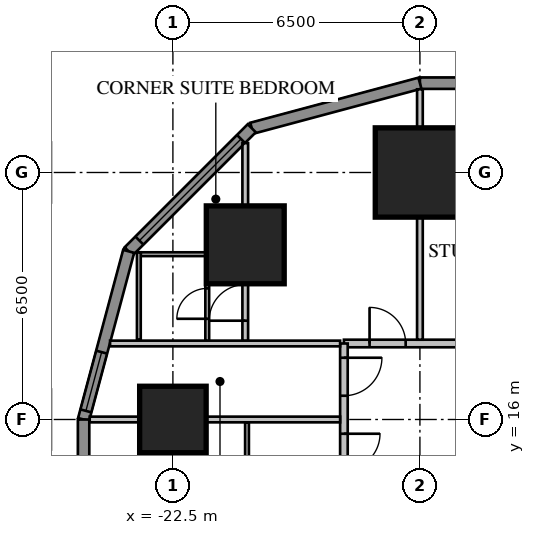
"""IFC4 building model, lengths in metres.
Left out: names, types, materials, properties, quantities, classifications, styles, units other than length and angle.
Written with IfcOpenShell. Run it as: python <this file> out.ifc"""

import sys

from ifc_helpers import new_model, si_unit, direction, frame, frame_2d, origin, origin_2d, place, context, subcontext, project, spatial, rectangle, extrude, element, fill, save


model = new_model("IFC4")
c1 = context("Model", 3, precision=1e-05, world=origin(), true_north=direction((0.0, 1.0)))
c2 = subcontext(c1, "Body", "Model", "MODEL_VIEW")
j1 = project(units=[si_unit("LENGTHUNIT", "METRE"), si_unit("PLANEANGLEUNIT", "RADIAN")], contexts=[c1])
p1 = place(None, origin())
s1 = spatial("IfcSite", under=j1, at=p1, CompositionType="ELEMENT")
p2 = place(p1, origin())
s2 = spatial("IfcBuilding", under=s1, at=p2, CompositionType="ELEMENT")
p3 = place(p2, frame((0.0, 0.0, 50.65)))
s3 = spatial("IfcBuildingStorey", under=s2, at=p3, CompositionType="ELEMENT", Elevation=50.65)
p4 = place(p3, frame((-16.0, 22.5, 0.0), z_axis=(0.0, 0.0, 1.0), x_axis=(1.0, 0.0, 0.0)))
e1 = element("IfcColumn", 1, at=p4, inside=s3, PredefinedType="COLUMN", context=c2, shape_type="SweptSolid", body=[
    extrude(rectangle(XDim=2.35, YDim=2.35, at=origin_2d()), origin(), (0.0, 0.0, 1.0), 3.413),
])
p5 = place(p3, frame((-20.596, 20.596, 0.0), z_axis=(0.0, 0.0, 1.0), x_axis=(1.0, 0.0, 0.0)))
e2 = element("IfcColumn", 2, at=p5, inside=s3, PredefinedType="COLUMN", context=c2, shape_type="SweptSolid", body=[
    extrude(rectangle(XDim=2.05, YDim=2.05, at=origin_2d()), origin(), (0.0, 0.0, 1.0), 3.413),
])
p6 = place(p3, frame((-22.5, 16.0, 0.0), z_axis=(0.0, 0.0, 1.0), x_axis=(1.0, 0.0, 0.0)))
e3 = element("IfcColumn", 3, at=p6, inside=s3, PredefinedType="COLUMN", context=c2, shape_type="SweptSolid", body=[
    extrude(rectangle(XDim=1.75, YDim=1.75, at=origin_2d()), origin(), (0.0, 0.0, 1.0), 3.413),
])
p7 = place(p3, frame((16.0, 24.85, 0.0), z_axis=(0.0, 0.0, 1.0), x_axis=(-1.0, 0.0, 0.0)))
e4 = element("IfcWall", 4, at=p7, inside=s3, PredefinedType="SOLIDWALL", context=c2, shape_type="SweptSolid", body=[
    extrude(rectangle(XDim=32.0, YDim=0.3, at=frame_2d((16.0, 0.0))), origin(), (0.0, 0.0, 1.0), 3.65),
])
p8 = place(p7, frame((1.2, 0.0, 0.75)))
e5 = element("IfcOpeningElement", 5, at=p8, cuts=e4, PredefinedType="OPENING", context=c2, shape_type="SweptSolid", body=[
    extrude(rectangle(XDim=1.6, YDim=1.8, at=frame_2d((0.8, 0.9))), frame((0.0, 0.17, 0.0), z_axis=(0.0, -1.0, 0.0), x_axis=(1.0, 0.0, 0.0)), (0.0, 0.0, 1.0), 0.34),
])
p9 = place(p7, frame((5.2, 0.0, 0.75)))
e6 = element("IfcOpeningElement", 6, at=p9, cuts=e4, PredefinedType="OPENING", context=c2, shape_type="SweptSolid", body=[
    extrude(rectangle(XDim=1.6, YDim=1.8, at=frame_2d((0.8, 0.9))), frame((0.0, 0.17, 0.0), z_axis=(0.0, -1.0, 0.0), x_axis=(1.0, 0.0, 0.0)), (0.0, 0.0, 1.0), 0.34),
])
p10 = place(p7, frame((17.2, 0.0, 0.75)))
e7 = element("IfcOpeningElement", 7, at=p10, cuts=e4, PredefinedType="OPENING", context=c2, shape_type="SweptSolid", body=[
    extrude(rectangle(XDim=1.6, YDim=1.8, at=frame_2d((0.8, 0.9))), frame((0.0, 0.17, 0.0), z_axis=(0.0, -1.0, 0.0), x_axis=(1.0, 0.0, 0.0)), (0.0, 0.0, 1.0), 0.34),
])
p11 = place(p7, frame((21.2, 0.0, 0.75)))
e8 = element("IfcOpeningElement", 8, at=p11, cuts=e4, PredefinedType="OPENING", context=c2, shape_type="SweptSolid", body=[
    extrude(rectangle(XDim=1.6, YDim=1.8, at=frame_2d((0.8, 0.9))), frame((0.0, 0.17, 0.0), z_axis=(0.0, -1.0, 0.0), x_axis=(1.0, 0.0, 0.0)), (0.0, 0.0, 1.0), 0.34),
])
p12 = place(p7, frame((25.2, 0.0, 0.75)))
e9 = element("IfcOpeningElement", 9, at=p12, cuts=e4, PredefinedType="OPENING", context=c2, shape_type="SweptSolid", body=[
    extrude(rectangle(XDim=1.6, YDim=1.8, at=frame_2d((0.8, 0.9))), frame((0.0, 0.17, 0.0), z_axis=(0.0, -1.0, 0.0), x_axis=(1.0, 0.0, 0.0)), (0.0, 0.0, 1.0), 0.34),
])
p13 = place(p7, frame((29.2, 0.0, 0.75)))
e10 = element("IfcOpeningElement", 10, at=p13, cuts=e4, PredefinedType="OPENING", context=c2, shape_type="SweptSolid", body=[
    extrude(rectangle(XDim=1.6, YDim=1.8, at=frame_2d((0.8, 0.9))), frame((0.0, 0.17, 0.0), z_axis=(0.0, -1.0, 0.0), x_axis=(1.0, 0.0, 0.0)), (0.0, 0.0, 1.0), 0.34),
])
p14 = place(p7, frame((8.8, 0.0, 0.75)))
e11 = element("IfcOpeningElement", 11, at=p14, cuts=e4, PredefinedType="OPENING", context=c2, shape_type="SweptSolid", body=[
    extrude(rectangle(XDim=2.4, YDim=1.8, at=frame_2d((1.2, 0.9))), frame((0.0, 0.17, 0.0), z_axis=(0.0, -1.0, 0.0), x_axis=(1.0, 0.0, 0.0)), (0.0, 0.0, 1.0), 0.34),
])
p15 = place(p7, frame((13.812, 0.0, 0.0)))
e12 = element("IfcOpeningElement", 12, at=p15, cuts=e4, PredefinedType="OPENING", context=c2, shape_type="SweptSolid", body=[
    extrude(rectangle(XDim=1.0, YDim=2.4, at=frame_2d((0.5, 1.2))), frame((0.0, 0.17, 0.0), z_axis=(0.0, -1.0, 0.0), x_axis=(1.0, 0.0, 0.0)), (0.0, 0.0, 1.0), 0.34),
])
p16 = place(p3, frame((-16.0, 24.85, 0.0), z_axis=(0.0, 0.0, 1.0), x_axis=(-0.965920218567, -0.258839972501, 0.0)))
e13 = element("IfcWall", 13, at=p16, inside=s3, PredefinedType="SOLIDWALL", context=c2, shape_type="SweptSolid", body=[
    extrude(rectangle(XDim=4.581, YDim=0.3, at=frame_2d((2.291, 0.0))), origin(), (0.0, 0.0, 1.0), 3.65),
])
p17 = place(p3, frame((-20.425, 23.664, 0.0), z_axis=(0.0, 0.0, 1.0), x_axis=(-0.707106781187, -0.707106781187, 0.0)))
e14 = element("IfcWall", 14, at=p17, inside=s3, PredefinedType="SOLIDWALL", context=c2, shape_type="SweptSolid", body=[
    extrude(rectangle(XDim=4.581, YDim=0.3, at=frame_2d((2.291, 0.0))), origin(), (0.0, 0.0, 1.0), 3.65),
])
p18 = place(p17, frame((0.4, 0.0, 0.75)))
e15 = element("IfcOpeningElement", 15, at=p18, cuts=e14, PredefinedType="OPENING", context=c2, shape_type="SweptSolid", body=[
    extrude(rectangle(XDim=3.781, YDim=1.8, at=frame_2d((1.891, 0.9))), frame((0.0, 0.17, 0.0), z_axis=(0.0, -1.0, 0.0), x_axis=(1.0, 0.0, 0.0)), (0.0, 0.0, 1.0), 0.34),
])
p19 = place(p3, frame((-23.664, 20.425, 0.0), z_axis=(0.0, 0.0, 1.0), x_axis=(-0.258839972501, -0.965920218567, 0.0)))
e16 = element("IfcWall", 16, at=p19, inside=s3, PredefinedType="SOLIDWALL", context=c2, shape_type="SweptSolid", body=[
    extrude(rectangle(XDim=4.581, YDim=0.3, at=frame_2d((2.291, 0.0))), origin(), (0.0, 0.0, 1.0), 3.65),
])
p20 = place(p19, frame((2.746, 0.0, 0.75)))
e17 = element("IfcOpeningElement", 17, at=p20, cuts=e16, PredefinedType="OPENING", context=c2, shape_type="SweptSolid", body=[
    extrude(rectangle(XDim=1.6, YDim=1.8, at=frame_2d((0.8, 0.9))), frame((0.0, 0.17, 0.0), z_axis=(0.0, -1.0, 0.0), x_axis=(1.0, 0.0, 0.0)), (0.0, 0.0, 1.0), 0.34),
])
p21 = place(p3, frame((-24.85, 16.0, 0.0), z_axis=(0.0, 0.0, 1.0), x_axis=(0.0, -1.0, 0.0)))
e18 = element("IfcWall", 18, at=p21, inside=s3, PredefinedType="SOLIDWALL", context=c2, shape_type="SweptSolid", body=[
    extrude(rectangle(XDim=32.0, YDim=0.3, at=frame_2d((16.0, 0.0))), origin(), (0.0, 0.0, 1.0), 3.65),
])
p22 = place(p21, frame((1.2, 0.0, 0.75)))
e19 = element("IfcOpeningElement", 19, at=p22, cuts=e18, PredefinedType="OPENING", context=c2, shape_type="SweptSolid", body=[
    extrude(rectangle(XDim=1.6, YDim=1.8, at=frame_2d((0.8, 0.9))), frame((0.0, 0.17, 0.0), z_axis=(0.0, -1.0, 0.0), x_axis=(1.0, 0.0, 0.0)), (0.0, 0.0, 1.0), 0.34),
])
p23 = place(p21, frame((5.2, 0.0, 0.75)))
e20 = element("IfcOpeningElement", 20, at=p23, cuts=e18, PredefinedType="OPENING", context=c2, shape_type="SweptSolid", body=[
    extrude(rectangle(XDim=1.6, YDim=1.8, at=frame_2d((0.8, 0.9))), frame((0.0, 0.17, 0.0), z_axis=(0.0, -1.0, 0.0), x_axis=(1.0, 0.0, 0.0)), (0.0, 0.0, 1.0), 0.34),
])
p24 = place(p21, frame((17.2, 0.0, 0.75)))
e21 = element("IfcOpeningElement", 21, at=p24, cuts=e18, PredefinedType="OPENING", context=c2, shape_type="SweptSolid", body=[
    extrude(rectangle(XDim=1.6, YDim=1.8, at=frame_2d((0.8, 0.9))), frame((0.0, 0.17, 0.0), z_axis=(0.0, -1.0, 0.0), x_axis=(1.0, 0.0, 0.0)), (0.0, 0.0, 1.0), 0.34),
])
p25 = place(p21, frame((21.2, 0.0, 0.75)))
e22 = element("IfcOpeningElement", 22, at=p25, cuts=e18, PredefinedType="OPENING", context=c2, shape_type="SweptSolid", body=[
    extrude(rectangle(XDim=1.6, YDim=1.8, at=frame_2d((0.8, 0.9))), frame((0.0, 0.17, 0.0), z_axis=(0.0, -1.0, 0.0), x_axis=(1.0, 0.0, 0.0)), (0.0, 0.0, 1.0), 0.34),
])
p26 = place(p21, frame((25.2, 0.0, 0.75)))
e23 = element("IfcOpeningElement", 23, at=p26, cuts=e18, PredefinedType="OPENING", context=c2, shape_type="SweptSolid", body=[
    extrude(rectangle(XDim=1.6, YDim=1.8, at=frame_2d((0.8, 0.9))), frame((0.0, 0.17, 0.0), z_axis=(0.0, -1.0, 0.0), x_axis=(1.0, 0.0, 0.0)), (0.0, 0.0, 1.0), 0.34),
])
p27 = place(p21, frame((29.2, 0.0, 0.75)))
e24 = element("IfcOpeningElement", 24, at=p27, cuts=e18, PredefinedType="OPENING", context=c2, shape_type="SweptSolid", body=[
    extrude(rectangle(XDim=1.6, YDim=1.8, at=frame_2d((0.8, 0.9))), frame((0.0, 0.17, 0.0), z_axis=(0.0, -1.0, 0.0), x_axis=(1.0, 0.0, 0.0)), (0.0, 0.0, 1.0), 0.34),
])
p28 = place(p21, frame((8.8, 0.0, 0.75)))
e25 = element("IfcOpeningElement", 25, at=p28, cuts=e18, PredefinedType="OPENING", context=c2, shape_type="SweptSolid", body=[
    extrude(rectangle(XDim=2.4, YDim=1.8, at=frame_2d((1.2, 0.9))), frame((0.0, 0.17, 0.0), z_axis=(0.0, -1.0, 0.0), x_axis=(1.0, 0.0, 0.0)), (0.0, 0.0, 1.0), 0.34),
])
p29 = place(p21, frame((13.812, 0.0, 0.0)))
e26 = element("IfcOpeningElement", 26, at=p29, cuts=e18, PredefinedType="OPENING", context=c2, shape_type="SweptSolid", body=[
    extrude(rectangle(XDim=1.0, YDim=2.4, at=frame_2d((0.5, 1.2))), frame((0.0, 0.17, 0.0), z_axis=(0.0, -1.0, 0.0), x_axis=(1.0, 0.0, 0.0)), (0.0, 0.0, 1.0), 0.34),
])
p30 = place(p3, frame((18.0, 18.0, 0.0), z_axis=(0.0, 0.0, 1.0), x_axis=(-1.0, 0.0, 0.0)))
e27 = element("IfcWall", 27, at=p30, inside=s3, PredefinedType="PARTITIONING", context=c2, shape_type="SweptSolid", body=[
    extrude(rectangle(XDim=36.0, YDim=0.2, at=frame_2d((18.0, 0.0))), origin(), (0.0, 0.0, 1.0), 3.65),
])
p31 = place(p30, frame((0.375, 0.0, 0.0)))
e28 = element("IfcOpeningElement", 28, at=p31, cuts=e27, PredefinedType="OPENING", context=c2, shape_type="SweptSolid", body=[
    extrude(rectangle(XDim=1.0, YDim=2.1, at=frame_2d((0.5, 1.05))), frame((0.0, 0.12, 0.0), z_axis=(0.0, -1.0, 0.0), x_axis=(1.0, 0.0, 0.0)), (0.0, 0.0, 1.0), 0.24),
])
p32 = place(p30, frame((3.95, 0.0, 0.0)))
e29 = element("IfcOpeningElement", 29, at=p32, cuts=e27, PredefinedType="OPENING", context=c2, shape_type="SweptSolid", body=[
    extrude(rectangle(XDim=0.95, YDim=2.1, at=frame_2d((0.475, 1.05))), frame((0.0, 0.12, 0.0), z_axis=(0.0, -1.0, 0.0), x_axis=(1.0, 0.0, 0.0)), (0.0, 0.0, 1.0), 0.24),
])
p33 = place(p30, frame((7.95, 0.0, 0.0)))
e30 = element("IfcOpeningElement", 30, at=p33, cuts=e27, PredefinedType="OPENING", context=c2, shape_type="SweptSolid", body=[
    extrude(rectangle(XDim=0.95, YDim=2.1, at=frame_2d((0.475, 1.05))), frame((0.0, 0.12, 0.0), z_axis=(0.0, -1.0, 0.0), x_axis=(1.0, 0.0, 0.0)), (0.0, 0.0, 1.0), 0.24),
])
p34 = place(p30, frame((19.95, 0.0, 0.0)))
e31 = element("IfcOpeningElement", 31, at=p34, cuts=e27, PredefinedType="OPENING", context=c2, shape_type="SweptSolid", body=[
    extrude(rectangle(XDim=0.95, YDim=2.1, at=frame_2d((0.475, 1.05))), frame((0.0, 0.12, 0.0), z_axis=(0.0, -1.0, 0.0), x_axis=(1.0, 0.0, 0.0)), (0.0, 0.0, 1.0), 0.24),
])
p35 = place(p30, frame((23.95, 0.0, 0.0)))
e32 = element("IfcOpeningElement", 32, at=p35, cuts=e27, PredefinedType="OPENING", context=c2, shape_type="SweptSolid", body=[
    extrude(rectangle(XDim=0.95, YDim=2.1, at=frame_2d((0.475, 1.05))), frame((0.0, 0.12, 0.0), z_axis=(0.0, -1.0, 0.0), x_axis=(1.0, 0.0, 0.0)), (0.0, 0.0, 1.0), 0.24),
])
p36 = place(p30, frame((27.95, 0.0, 0.0)))
e33 = element("IfcOpeningElement", 33, at=p36, cuts=e27, PredefinedType="OPENING", context=c2, shape_type="SweptSolid", body=[
    extrude(rectangle(XDim=0.95, YDim=2.1, at=frame_2d((0.475, 1.05))), frame((0.0, 0.12, 0.0), z_axis=(0.0, -1.0, 0.0), x_axis=(1.0, 0.0, 0.0)), (0.0, 0.0, 1.0), 0.24),
])
p37 = place(p30, frame((31.95, 0.0, 0.0)))
e34 = element("IfcOpeningElement", 34, at=p37, cuts=e27, PredefinedType="OPENING", context=c2, shape_type="SweptSolid", body=[
    extrude(rectangle(XDim=0.95, YDim=2.1, at=frame_2d((0.475, 1.05))), frame((0.0, 0.12, 0.0), z_axis=(0.0, -1.0, 0.0), x_axis=(1.0, 0.0, 0.0)), (0.0, 0.0, 1.0), 0.24),
])
p38 = place(p30, frame((34.375, 0.0, 0.0)))
e35 = element("IfcOpeningElement", 35, at=p38, cuts=e27, PredefinedType="OPENING", context=c2, shape_type="SweptSolid", body=[
    extrude(rectangle(XDim=0.95, YDim=2.1, at=frame_2d((0.475, 1.05))), frame((0.0, 0.12, 0.0), z_axis=(0.0, -1.0, 0.0), x_axis=(1.0, 0.0, 0.0)), (0.0, 0.0, 1.0), 0.24),
])
p39 = place(p30, frame((11.2, 0.0, 0.0)))
e36 = element("IfcOpeningElement", 36, at=p39, cuts=e27, PredefinedType="OPENING", context=c2, shape_type="SweptSolid", body=[
    extrude(rectangle(XDim=1.0, YDim=2.1, at=frame_2d((0.5, 1.05))), frame((0.0, 0.12, 0.0), z_axis=(0.0, -1.0, 0.0), x_axis=(1.0, 0.0, 0.0)), (0.0, 0.0, 1.0), 0.24),
])
p40 = place(p30, frame((15.2, 0.0, 0.0)))
e37 = element("IfcOpeningElement", 37, at=p40, cuts=e27, PredefinedType="OPENING", context=c2, shape_type="SweptSolid", body=[
    extrude(rectangle(XDim=1.0, YDim=2.1, at=frame_2d((0.5, 1.05))), frame((0.0, 0.12, 0.0), z_axis=(0.0, -1.0, 0.0), x_axis=(1.0, 0.0, 0.0)), (0.0, 0.0, 1.0), 0.24),
])
p41 = place(p3, frame((-16.0, 18.1, 0.0), z_axis=(0.0, 0.0, 1.0), x_axis=(0.0, 1.0, 0.0)))
e38 = element("IfcWall", 38, at=p41, inside=s3, PredefinedType="PARTITIONING", context=c2, shape_type="SweptSolid", body=[
    extrude(rectangle(XDim=6.589, YDim=0.15, at=frame_2d((3.295, 0.0))), origin(), (0.0, 0.0, 1.0), 3.65),
])
p42 = place(p3, frame((-21.596, 18.065, 0.0), z_axis=(0.0, 0.0, 1.0), x_axis=(0.0, 1.0, 0.0)))
e39 = element("IfcWall", 39, at=p42, inside=s3, PredefinedType="PARTITIONING", context=c2, shape_type="SweptSolid", body=[
    extrude(rectangle(XDim=2.335, YDim=0.1, at=frame_2d((1.167, 0.0))), origin(), (0.0, 0.0, 1.0), 3.65),
])
p43 = place(p42, frame((0.585, 0.0, 0.0)))
e40 = element("IfcOpeningElement", 40, at=p43, cuts=e39, PredefinedType="OPENING", context=c2, shape_type="SweptSolid", body=[
    extrude(rectangle(XDim=0.8, YDim=2.1, at=frame_2d((0.4, 1.05))), frame((0.0, 0.07, 0.0), z_axis=(0.0, -1.0, 0.0), x_axis=(1.0, 0.0, 0.0)), (0.0, 0.0, 1.0), 0.14),
])
p44 = place(p3, frame((-21.646, 20.35, 0.0), z_axis=(0.0, 0.0, 1.0), x_axis=(-1.0, 0.0, 0.0)))
e41 = element("IfcWall", 41, at=p44, inside=s3, PredefinedType="PARTITIONING", context=c2, shape_type="SweptSolid", body=[
    extrude(rectangle(XDim=1.7, YDim=0.1, at=frame_2d((0.85, 0.0))), origin(), (0.0, 0.0, 1.0), 3.65),
])
p45 = place(p3, frame((-23.396, 18.1, 0.0), z_axis=(0.0, 0.0, 1.0), x_axis=(0.0, 1.0, 0.0)))
e42 = element("IfcWall", 42, at=p45, inside=s3, PredefinedType="PARTITIONING", context=c2, shape_type="SweptSolid", body=[
    extrude(rectangle(XDim=2.3, YDim=0.1, at=frame_2d((1.15, 0.0))), origin(), (0.0, 0.0, 1.0), 3.65),
])
p46 = place(p3, frame((-20.596, 18.065, 0.0), z_axis=(0.0, 0.0, 1.0), x_axis=(0.0, 1.0, 0.0)))
e43 = element("IfcWall", 43, at=p46, inside=s3, PredefinedType="PARTITIONING", context=c2, shape_type="SweptSolid", body=[
    extrude(rectangle(XDim=5.209, YDim=0.15, at=frame_2d((2.604, 0.0))), origin(), (0.0, 0.0, 1.0), 3.65),
])
p47 = place(p46, frame((0.535, 0.0, 0.0)))
e44 = element("IfcOpeningElement", 44, at=p47, cuts=e43, PredefinedType="OPENING", context=c2, shape_type="SweptSolid", body=[
    extrude(rectangle(XDim=0.95, YDim=2.1, at=frame_2d((0.475, 1.05))), frame((0.0, 0.095, 0.0), z_axis=(0.0, -1.0, 0.0), x_axis=(1.0, 0.0, 0.0)), (0.0, 0.0, 1.0), 0.19),
])
p48 = place(p3, frame((-18.0, 18.0, 0.0), z_axis=(0.0, 0.0, 1.0), x_axis=(0.0, -1.0, 0.0)))
e45 = element("IfcWall", 45, at=p48, inside=s3, PredefinedType="PARTITIONING", context=c2, shape_type="SweptSolid", body=[
    extrude(rectangle(XDim=36.0, YDim=0.2, at=frame_2d((18.0, 0.0))), origin(), (0.0, 0.0, 1.0), 3.65),
])
p49 = place(p48, frame((0.375, 0.0, 0.0)))
e46 = element("IfcOpeningElement", 46, at=p49, cuts=e45, PredefinedType="OPENING", context=c2, shape_type="SweptSolid", body=[
    extrude(rectangle(XDim=1.0, YDim=2.1, at=frame_2d((0.5, 1.05))), frame((0.0, 0.12, 0.0), z_axis=(0.0, -1.0, 0.0), x_axis=(1.0, 0.0, 0.0)), (0.0, 0.0, 1.0), 0.24),
])
p50 = place(p48, frame((2.375, 0.0, 0.0)))
e47 = element("IfcOpeningElement", 47, at=p50, cuts=e45, PredefinedType="OPENING", context=c2, shape_type="SweptSolid", body=[
    extrude(rectangle(XDim=0.95, YDim=2.1, at=frame_2d((0.475, 1.05))), frame((0.0, 0.12, 0.0), z_axis=(0.0, -1.0, 0.0), x_axis=(1.0, 0.0, 0.0)), (0.0, 0.0, 1.0), 0.24),
])
p51 = place(p48, frame((7.95, 0.0, 0.0)))
e48 = element("IfcOpeningElement", 48, at=p51, cuts=e45, PredefinedType="OPENING", context=c2, shape_type="SweptSolid", body=[
    extrude(rectangle(XDim=0.95, YDim=2.1, at=frame_2d((0.475, 1.05))), frame((0.0, 0.12, 0.0), z_axis=(0.0, -1.0, 0.0), x_axis=(1.0, 0.0, 0.0)), (0.0, 0.0, 1.0), 0.24),
])
p52 = place(p48, frame((18.375, 0.0, 0.0)))
e49 = element("IfcOpeningElement", 49, at=p52, cuts=e45, PredefinedType="OPENING", context=c2, shape_type="SweptSolid", body=[
    extrude(rectangle(XDim=0.95, YDim=2.1, at=frame_2d((0.475, 1.05))), frame((0.0, 0.12, 0.0), z_axis=(0.0, -1.0, 0.0), x_axis=(1.0, 0.0, 0.0)), (0.0, 0.0, 1.0), 0.24),
])
p53 = place(p48, frame((23.95, 0.0, 0.0)))
e50 = element("IfcOpeningElement", 50, at=p53, cuts=e45, PredefinedType="OPENING", context=c2, shape_type="SweptSolid", body=[
    extrude(rectangle(XDim=0.95, YDim=2.1, at=frame_2d((0.475, 1.05))), frame((0.0, 0.12, 0.0), z_axis=(0.0, -1.0, 0.0), x_axis=(1.0, 0.0, 0.0)), (0.0, 0.0, 1.0), 0.24),
])
p54 = place(p48, frame((26.375, 0.0, 0.0)))
e51 = element("IfcOpeningElement", 51, at=p54, cuts=e45, PredefinedType="OPENING", context=c2, shape_type="SweptSolid", body=[
    extrude(rectangle(XDim=0.95, YDim=2.1, at=frame_2d((0.475, 1.05))), frame((0.0, 0.12, 0.0), z_axis=(0.0, -1.0, 0.0), x_axis=(1.0, 0.0, 0.0)), (0.0, 0.0, 1.0), 0.24),
])
p55 = place(p48, frame((31.95, 0.0, 0.0)))
e52 = element("IfcOpeningElement", 52, at=p55, cuts=e45, PredefinedType="OPENING", context=c2, shape_type="SweptSolid", body=[
    extrude(rectangle(XDim=0.95, YDim=2.1, at=frame_2d((0.475, 1.05))), frame((0.0, 0.12, 0.0), z_axis=(0.0, -1.0, 0.0), x_axis=(1.0, 0.0, 0.0)), (0.0, 0.0, 1.0), 0.24),
])
p56 = place(p48, frame((34.375, 0.0, 0.0)))
e53 = element("IfcOpeningElement", 53, at=p56, cuts=e45, PredefinedType="OPENING", context=c2, shape_type="SweptSolid", body=[
    extrude(rectangle(XDim=0.95, YDim=2.1, at=frame_2d((0.475, 1.05))), frame((0.0, 0.12, 0.0), z_axis=(0.0, -1.0, 0.0), x_axis=(1.0, 0.0, 0.0)), (0.0, 0.0, 1.0), 0.24),
])
p57 = place(p48, frame((11.2, 0.0, 0.0)))
e54 = element("IfcOpeningElement", 54, at=p57, cuts=e45, PredefinedType="OPENING", context=c2, shape_type="SweptSolid", body=[
    extrude(rectangle(XDim=1.0, YDim=2.1, at=frame_2d((0.5, 1.05))), frame((0.0, 0.12, 0.0), z_axis=(0.0, -1.0, 0.0), x_axis=(1.0, 0.0, 0.0)), (0.0, 0.0, 1.0), 0.24),
])
p58 = place(p3, frame((-18.1, 18.0, 0.0), z_axis=(0.0, 0.0, 1.0), x_axis=(-1.0, 0.0, 0.0)))
e55 = element("IfcWall", 55, at=p58, inside=s3, PredefinedType="PARTITIONING", context=c2, shape_type="SweptSolid", body=[
    extrude(rectangle(XDim=6.053, YDim=0.15, at=frame_2d((3.027, 0.0))), origin(), (0.0, 0.0, 1.0), 3.65),
])
p59 = place(p3, frame((-18.1, 16.0, 0.0), z_axis=(0.0, 0.0, 1.0), x_axis=(-1.0, 0.0, 0.0)))
e56 = element("IfcWall", 56, at=p59, inside=s3, PredefinedType="PARTITIONING", context=c2, shape_type="SweptSolid", body=[
    extrude(rectangle(XDim=6.589, YDim=0.15, at=frame_2d((3.295, 0.0))), origin(), (0.0, 0.0, 1.0), 3.65),
])
p60 = place(p3, frame((-20.55, 15.925, 0.0), z_axis=(0.0, 0.0, 1.0), x_axis=(0.0, -1.0, 0.0)))
e57 = element("IfcWall", 57, at=p60, inside=s3, PredefinedType="PARTITIONING", context=c2, shape_type="SweptSolid", body=[
    extrude(rectangle(XDim=2.15, YDim=0.1, at=frame_2d((1.075, 0.0))), origin(), (0.0, 0.0, 1.0), 3.65),
])
p61 = place(p60, frame((1.05, 0.0, 0.0)))
e58 = element("IfcOpeningElement", 58, at=p61, cuts=e57, PredefinedType="OPENING", context=c2, shape_type="SweptSolid", body=[
    extrude(rectangle(XDim=0.9, YDim=2.1, at=frame_2d((0.45, 1.05))), frame((0.0, 0.07, 0.0), z_axis=(0.0, -1.0, 0.0), x_axis=(1.0, 0.0, 0.0)), (0.0, 0.0, 1.0), 0.14),
])
p62 = place(p18, origin())
e59 = element("IfcWindow", 59, at=p62, inside=s3, PartitioningType="SINGLE_PANEL", PredefinedType="WINDOW", context=c2, shape_type="SweptSolid", body=[
    extrude(rectangle(XDim=3.781, YDim=1.8, at=frame_2d((1.891, 0.9))), frame((0.0, 0.03, 0.0), z_axis=(0.0, -1.0, 0.0), x_axis=(1.0, 0.0, 0.0)), (0.0, 0.0, 1.0), 0.06),
])
fill(e15, e59)
p63 = place(p20, origin())
e60 = element("IfcWindow", 60, at=p63, inside=s3, PartitioningType="SINGLE_PANEL", PredefinedType="WINDOW", context=c2, shape_type="SweptSolid", body=[
    extrude(rectangle(XDim=1.6, YDim=1.8, at=frame_2d((0.8, 0.9))), frame((0.0, 0.03, 0.0), z_axis=(0.0, -1.0, 0.0), x_axis=(1.0, 0.0, 0.0)), (0.0, 0.0, 1.0), 0.06),
])
fill(e17, e60)
p64 = place(p38, origin())
e61 = element("IfcDoor", 61, at=p64, inside=s3, OperationType="SINGLE_SWING_RIGHT", PredefinedType="DOOR", context=c2, shape_type="SweptSolid", body=[
    extrude(rectangle(XDim=0.95, YDim=2.1, at=frame_2d((0.475, 1.05))), frame((0.0, 0.025, 0.0), z_axis=(0.0, -1.0, 0.0), x_axis=(1.0, 0.0, 0.0)), (0.0, 0.0, 1.0), 0.05),
])
fill(e35, e61)
p65 = place(p43, origin())
e62 = element("IfcDoor", 62, at=p65, inside=s3, OperationType="SINGLE_SWING_LEFT", PredefinedType="DOOR", context=c2, shape_type="SweptSolid", body=[
    extrude(rectangle(XDim=0.8, YDim=2.1, at=frame_2d((0.4, 1.05))), frame((0.0, 0.025, 0.0), z_axis=(0.0, -1.0, 0.0), x_axis=(1.0, 0.0, 0.0)), (0.0, 0.0, 1.0), 0.05),
])
fill(e40, e62)
p66 = place(p47, origin())
e63 = element("IfcDoor", 63, at=p66, inside=s3, OperationType="SINGLE_SWING_LEFT", PredefinedType="DOOR", context=c2, shape_type="SweptSolid", body=[
    extrude(rectangle(XDim=0.95, YDim=2.1, at=frame_2d((0.475, 1.05))), frame((0.0, 0.025, 0.0), z_axis=(0.0, -1.0, 0.0), x_axis=(1.0, 0.0, 0.0)), (0.0, 0.0, 1.0), 0.05),
])
fill(e44, e63)
p67 = place(p49, origin())
e64 = element("IfcDoor", 64, at=p67, inside=s3, OperationType="SINGLE_SWING_LEFT", PredefinedType="DOOR", context=c2, shape_type="SweptSolid", body=[
    extrude(rectangle(XDim=1.0, YDim=2.1, at=frame_2d((0.5, 1.05))), frame((0.0, 0.025, 0.0), z_axis=(0.0, -1.0, 0.0), x_axis=(1.0, 0.0, 0.0)), (0.0, 0.0, 1.0), 0.05),
])
fill(e46, e64)
p68 = place(p50, origin())
e65 = element("IfcDoor", 65, at=p68, inside=s3, OperationType="SINGLE_SWING_LEFT", PredefinedType="DOOR", context=c2, shape_type="SweptSolid", body=[
    extrude(rectangle(XDim=0.95, YDim=2.1, at=frame_2d((0.475, 1.05))), frame((0.0, 0.025, 0.0), z_axis=(0.0, -1.0, 0.0), x_axis=(1.0, 0.0, 0.0)), (0.0, 0.0, 1.0), 0.05),
])
fill(e47, e65)
save(model, sys.argv[1])
